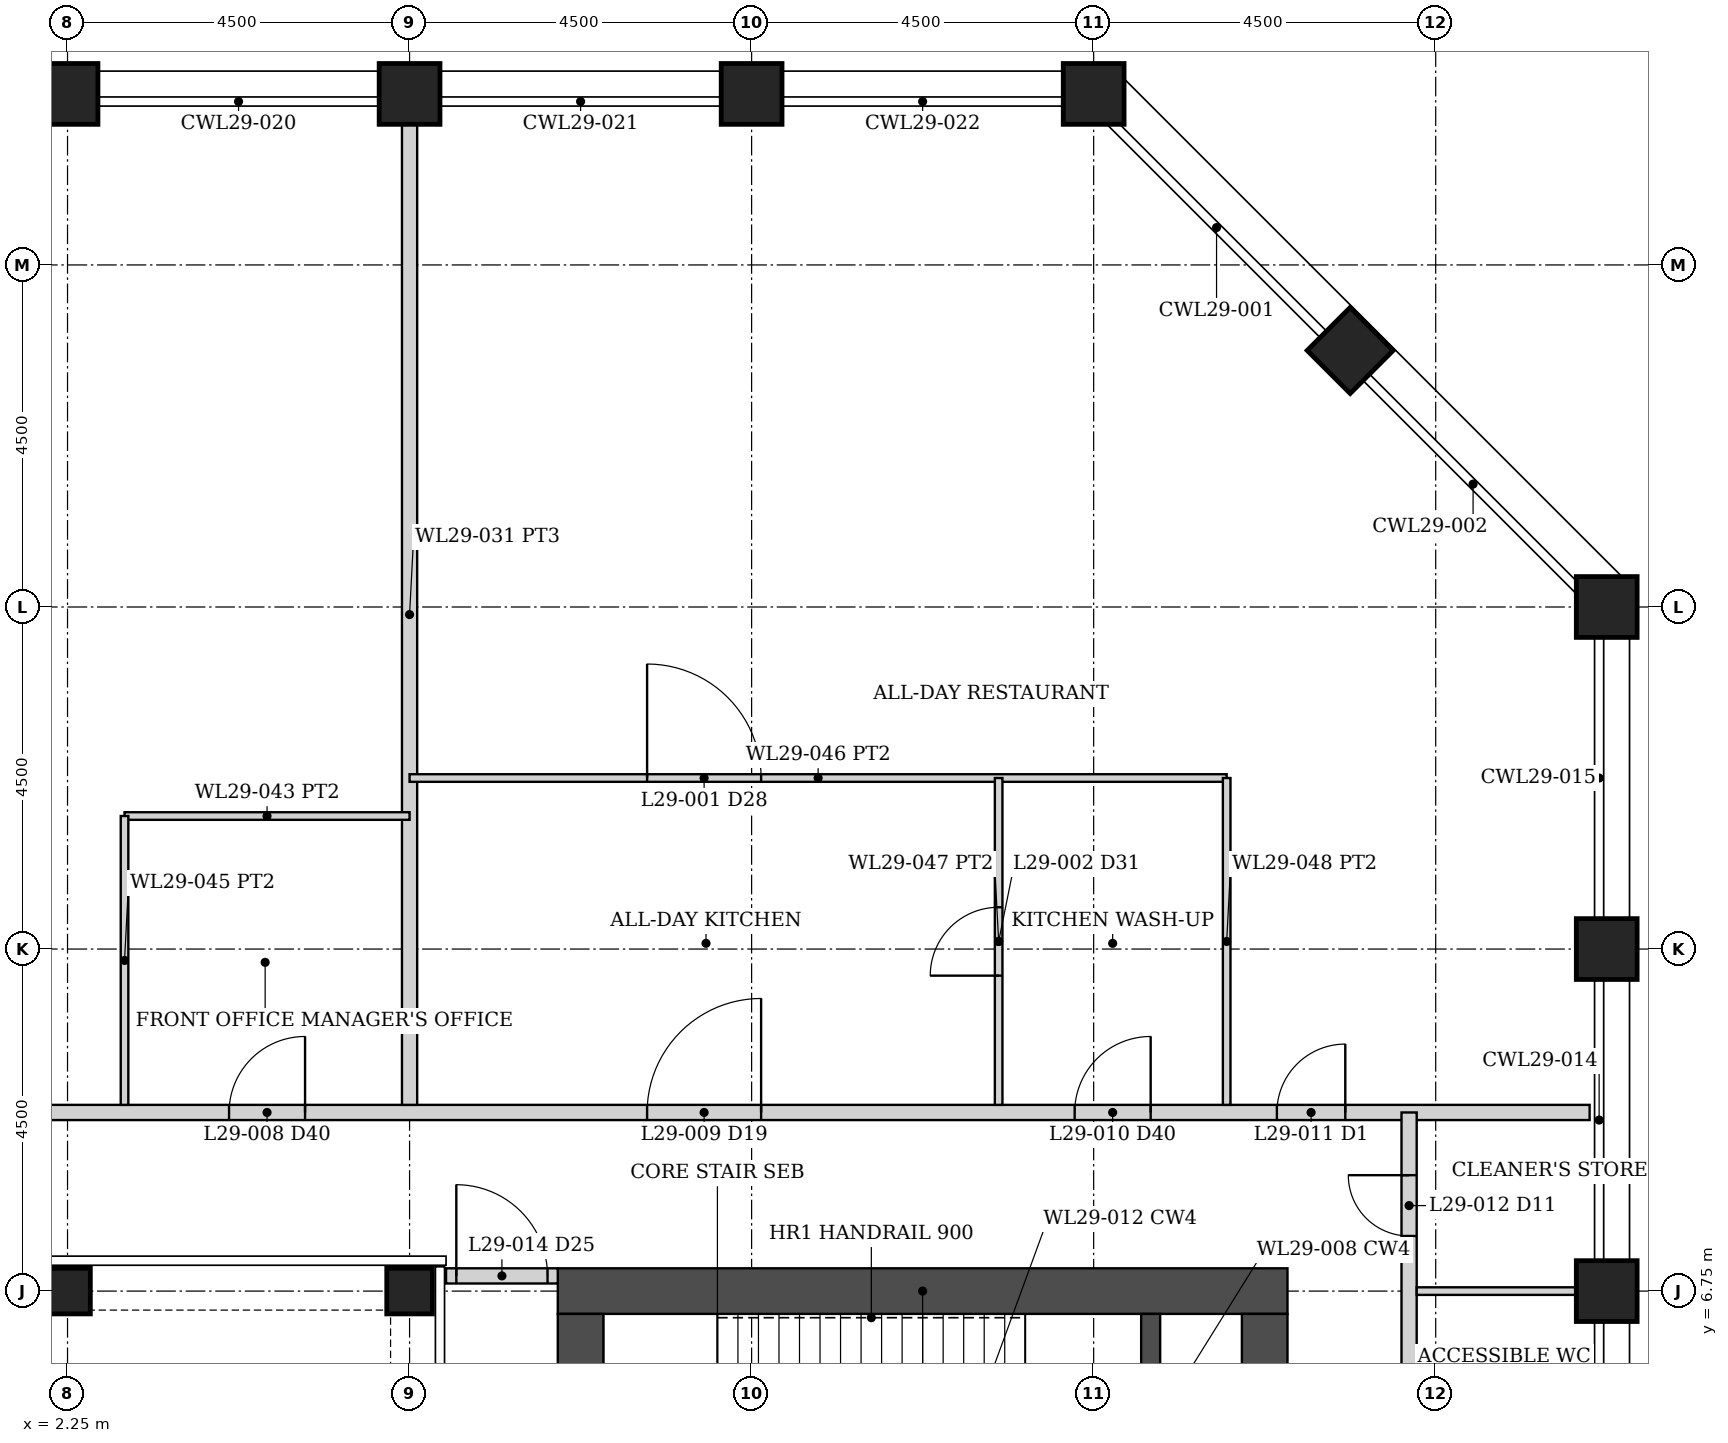
"""IFC4 building model, lengths in metres.
Left out: names, types, materials, properties, quantities, classifications, styles, units other than length and angle.
Written with IfcOpenShell. Run it as: python <this file> out.ifc"""

import sys

from ifc_helpers import new_model, si_unit, direction, frame, frame_2d, origin, origin_2d, place, context, subcontext, project, spatial, rectangle, hollow_rectangle, extrude, element, fill, save


model = new_model("IFC4")
c1 = context("Model", 3, precision=1e-05, world=origin(), true_north=direction((0.0, 1.0)))
c2 = subcontext(c1, "Body", "Model", "MODEL_VIEW")
j1 = project(units=[si_unit("LENGTHUNIT", "METRE"), si_unit("PLANEANGLEUNIT", "RADIAN")], contexts=[c1])
p1 = place(None, origin())
s1 = spatial("IfcSite", under=j1, at=p1, CompositionType="ELEMENT")
p2 = place(p1, origin())
s2 = spatial("IfcBuilding", under=s1, at=p2, CompositionType="ELEMENT")
p3 = place(p2, frame((0.0, 0.0, 112.4)))
s3 = spatial("IfcBuildingStorey", under=s2, at=p3, CompositionType="ELEMENT", Elevation=112.4)
for number, where, z_axis, x_axis in (
    (1, (2.25, 22.5, 0.0), (0.0, 0.0, 1.0), (0.0, 1.0, 0.0)),
    (2, (6.75, 22.5, 0.0), (0.0, 0.0, 1.0), (0.0, 1.0, 0.0)),
    (3, (22.5, 6.75, 0.0), (0.0, 0.0, 1.0), (1.0, 0.0, 0.0)),
    (4, (11.25, 22.5, 0.0), (0.0, 0.0, 1.0), (0.0, 1.0, 0.0)),
    (5, (22.5, 11.25, 0.0), (0.0, 0.0, 1.0), (1.0, 0.0, 0.0)),
    (6, (15.75, 22.5, 0.0), (0.0, 0.0, 1.0), (0.0, 1.0, 0.0)),
    (7, (22.5, 15.75, 0.0), (0.0, 0.0, 1.0), (1.0, 0.0, 0.0)),
    (8, (19.125, 19.125, 0.0), (0.0, 0.0, 1.0), (0.707, 0.707, 0.0)),
):
    element("IfcColumn", number, at=place(p3, frame(where, z_axis=z_axis, x_axis=x_axis)), inside=s3, PredefinedType="COLUMN", context=c2, shape_type="SweptSolid", body=[
        extrude(hollow_rectangle(XDim=0.8, YDim=0.8, WallThickness=0.06, at=origin_2d()), origin(), (0.0, 0.0, 1.0), 6.0),
    ])
for number, where, z_axis, x_axis in (
    (9, (2.25, 6.75, 0.0), (0.0, 0.0, 1.0), (1.0, 0.0, 0.0)),
    (10, (6.75, 6.75, 0.0), (0.0, 0.0, 1.0), (1.0, 0.0, 0.0)),
):
    element("IfcColumn", number, at=place(p3, frame(where, z_axis=z_axis, x_axis=x_axis)), inside=s3, PredefinedType="COLUMN", context=c2, shape_type="SweptSolid", body=[
        extrude(hollow_rectangle(XDim=0.6, YDim=0.6, WallThickness=0.04, at=origin_2d()), origin(), (0.0, 0.0, 1.0), 6.0),
    ])
p4 = place(p3, frame((8.7, 6.75, 0.0), z_axis=(0.0, 0.0, 1.0), x_axis=(1.0, 0.0, 0.0)))
e11 = element("IfcWall", 11, at=p4, inside=s3, PredefinedType="SHEAR", context=c2, shape_type="SweptSolid", body=[
    extrude(rectangle(XDim=9.6, YDim=0.6, at=frame_2d((4.8, 0.0))), origin(), (0.0, 0.0, 1.0), 6.0),
])
p5 = place(p3, frame((9.0, -6.45, 0.0), z_axis=(0.0, 0.0, 1.0), x_axis=(0.0, 1.0, 0.0)))
e12 = element("IfcWall", 12, at=p5, inside=s3, PredefinedType="SHEAR", context=c2, shape_type="SweptSolid", body=[
    extrude(rectangle(XDim=12.9, YDim=0.6, at=frame_2d((6.45, 0.0))), origin(), (0.0, 0.0, 1.0), 6.0),
])
p6 = place(p5, frame((3.55, 0.0, 0.0)))
e13 = element("IfcOpeningElement", 13, at=p6, cuts=e12, PredefinedType="OPENING", context=c2, shape_type="SweptSolid", body=[
    extrude(rectangle(XDim=1.0, YDim=2.1, at=frame_2d((0.5, 1.05))), frame((0.0, 0.31, 0.0), z_axis=(0.0, -1.0, 0.0), x_axis=(1.0, 0.0, 0.0)), (0.0, 0.0, 1.0), 0.62),
])
p7 = place(p5, frame((6.95, 0.0, 0.0)))
e14 = element("IfcOpeningElement", 14, at=p7, cuts=e12, PredefinedType="OPENING", context=c2, shape_type="SweptSolid", body=[
    extrude(rectangle(XDim=1.2, YDim=2.1, at=frame_2d((0.6, 1.05))), frame((0.0, 0.31, 0.0), z_axis=(0.0, -1.0, 0.0), x_axis=(1.0, 0.0, 0.0)), (0.0, 0.0, 1.0), 0.62),
])
p8 = place(p5, frame((10.85, 0.0, 0.0)))
e15 = element("IfcOpeningElement", 15, at=p8, cuts=e12, PredefinedType="OPENING", context=c2, shape_type="SweptSolid", body=[
    extrude(rectangle(XDim=1.0, YDim=2.1, at=frame_2d((0.5, 1.05))), frame((0.0, 0.31, 0.0), z_axis=(0.0, -1.0, 0.0), x_axis=(1.0, 0.0, 0.0)), (0.0, 0.0, 1.0), 0.62),
])
p9 = place(p3, frame((18.0, -6.45, 0.0), z_axis=(0.0, 0.0, 1.0), x_axis=(0.0, 1.0, 0.0)))
e16 = element("IfcWall", 16, at=p9, inside=s3, PredefinedType="SHEAR", context=c2, shape_type="SweptSolid", body=[
    extrude(rectangle(XDim=12.9, YDim=0.6, at=frame_2d((6.45, 0.0))), origin(), (0.0, 0.0, 1.0), 6.0),
])
p10 = place(p3, frame((16.5, 3.325, 0.0), z_axis=(0.0, 0.0, 1.0), x_axis=(0.0, 1.0, 0.0)))
e17 = element("IfcWall", 17, at=p10, inside=s3, PredefinedType="SHEAR", context=c2, shape_type="SweptSolid", body=[
    extrude(rectangle(XDim=3.125, YDim=0.25, at=frame_2d((1.562, 0.0))), origin(), (0.0, 0.0, 1.0), 6.0),
])
p11 = place(p3, frame((7.23, 6.95, 0.0), z_axis=(0.0, 0.0, 1.0), x_axis=(1.0, 0.0, 0.0)))
e18 = element("IfcWall", 18, at=p11, inside=s3, PredefinedType="PARTITIONING", context=c2, shape_type="SweptSolid", body=[
    extrude(rectangle(XDim=1.47, YDim=0.2, at=frame_2d((0.735, 0.0))), origin(), (0.0, 0.0, 1.0), 4.874),
])
p12 = place(p11, frame((0.135, 0.0, 0.0)))
e19 = element("IfcOpeningElement", 19, at=p12, cuts=e18, PredefinedType="OPENING", context=c2, shape_type="SweptSolid", body=[
    extrude(rectangle(XDim=1.2, YDim=2.1, at=frame_2d((0.6, 1.05))), frame((0.0, 0.11, 0.0), z_axis=(0.0, -1.0, 0.0), x_axis=(1.0, 0.0, 0.0)), (0.0, 0.0, 1.0), 0.22),
])
p13 = place(p3, frame((-22.275, 9.1, 0.0), z_axis=(0.0, 0.0, 1.0), x_axis=(1.0, 0.0, 0.0)))
e20 = element("IfcWall", 20, at=p13, inside=s3, PredefinedType="PARTITIONING", context=c2, shape_type="SweptSolid", body=[
    extrude(rectangle(XDim=44.55, YDim=0.2, at=frame_2d((22.275, 0.0))), origin(), (0.0, 0.0, 1.0), 4.874),
])
p14 = place(p13, frame((4.065, 0.0, 0.0)))
e21 = element("IfcOpeningElement", 21, at=p14, cuts=e20, PredefinedType="OPENING", context=c2, shape_type="SweptSolid", body=[
    extrude(rectangle(XDim=0.9, YDim=2.1, at=frame_2d((0.45, 1.05))), frame((0.0, 0.11, 0.0), z_axis=(0.0, -1.0, 0.0), x_axis=(1.0, 0.0, 0.0)), (0.0, 0.0, 1.0), 0.22),
])
p15 = place(p13, frame((9.625, 0.0, 0.0)))
e22 = element("IfcOpeningElement", 22, at=p15, cuts=e20, PredefinedType="OPENING", context=c2, shape_type="SweptSolid", body=[
    extrude(rectangle(XDim=0.8, YDim=2.1, at=frame_2d((0.4, 1.05))), frame((0.0, 0.11, 0.0), z_axis=(0.0, -1.0, 0.0), x_axis=(1.0, 0.0, 0.0)), (0.0, 0.0, 1.0), 0.22),
])
p16 = place(p13, frame((12.8, 0.0, 0.0)))
e23 = element("IfcOpeningElement", 23, at=p16, cuts=e20, PredefinedType="OPENING", context=c2, shape_type="SweptSolid", body=[
    extrude(rectangle(XDim=1.2, YDim=2.1, at=frame_2d((0.6, 1.05))), frame((0.0, 0.11, 0.0), z_axis=(0.0, -1.0, 0.0), x_axis=(1.0, 0.0, 0.0)), (0.0, 0.0, 1.0), 0.22),
])
p17 = place(p13, frame((21.825, 0.0, 0.0)))
e24 = element("IfcOpeningElement", 24, at=p17, cuts=e20, PredefinedType="OPENING", context=c2, shape_type="SweptSolid", body=[
    extrude(rectangle(XDim=0.9, YDim=2.1, at=frame_2d((0.45, 1.05))), frame((0.0, 0.11, 0.0), z_axis=(0.0, -1.0, 0.0), x_axis=(1.0, 0.0, 0.0)), (0.0, 0.0, 1.0), 0.22),
])
p18 = place(p13, frame((16.9, 0.0, 0.0)))
e25 = element("IfcOpeningElement", 25, at=p18, cuts=e20, PredefinedType="OPENING", context=c2, shape_type="SweptSolid", body=[
    extrude(rectangle(XDim=1.0, YDim=2.1, at=frame_2d((0.5, 1.05))), frame((0.0, 0.11, 0.0), z_axis=(0.0, -1.0, 0.0), x_axis=(1.0, 0.0, 0.0)), (0.0, 0.0, 1.0), 0.22),
])
p19 = place(p13, frame((26.65, 0.0, 0.0)))
e26 = element("IfcOpeningElement", 26, at=p19, cuts=e20, PredefinedType="OPENING", context=c2, shape_type="SweptSolid", body=[
    extrude(rectangle(XDim=1.0, YDim=2.1, at=frame_2d((0.5, 1.05))), frame((0.0, 0.11, 0.0), z_axis=(0.0, -1.0, 0.0), x_axis=(1.0, 0.0, 0.0)), (0.0, 0.0, 1.0), 0.22),
])
p20 = place(p13, frame((40.436, 0.0, 0.0)))
e27 = element("IfcOpeningElement", 27, at=p20, cuts=e20, PredefinedType="OPENING", context=c2, shape_type="SweptSolid", body=[
    extrude(rectangle(XDim=0.9, YDim=2.1, at=frame_2d((0.45, 1.05))), frame((0.0, 0.11, 0.0), z_axis=(0.0, -1.0, 0.0), x_axis=(1.0, 0.0, 0.0)), (0.0, 0.0, 1.0), 0.22),
])
p21 = place(p13, frame((32.15, 0.0, 0.0)))
e28 = element("IfcOpeningElement", 28, at=p21, cuts=e20, PredefinedType="OPENING", context=c2, shape_type="SweptSolid", body=[
    extrude(rectangle(XDim=1.5, YDim=2.1, at=frame_2d((0.75, 1.05))), frame((0.0, 0.11, 0.0), z_axis=(0.0, -1.0, 0.0), x_axis=(1.0, 0.0, 0.0)), (0.0, 0.0, 1.0), 0.22),
])
p22 = place(p13, frame((37.775, 0.0, 0.0)))
e29 = element("IfcOpeningElement", 29, at=p22, cuts=e20, PredefinedType="OPENING", context=c2, shape_type="SweptSolid", body=[
    extrude(rectangle(XDim=1.0, YDim=2.1, at=frame_2d((0.5, 1.05))), frame((0.0, 0.11, 0.0), z_axis=(0.0, -1.0, 0.0), x_axis=(1.0, 0.0, 0.0)), (0.0, 0.0, 1.0), 0.22),
])
p23 = place(p3, frame((19.9, -9.1, 0.0), z_axis=(0.0, 0.0, 1.0), x_axis=(0.0, 1.0, 0.0)))
e30 = element("IfcWall", 30, at=p23, inside=s3, PredefinedType="PARTITIONING", context=c2, shape_type="SweptSolid", body=[
    extrude(rectangle(XDim=18.2, YDim=0.2, at=frame_2d((9.1, 0.0))), origin(), (0.0, 0.0, 1.0), 4.874),
])
p24 = place(p23, frame((2.975, 0.0, 0.0)))
e31 = element("IfcOpeningElement", 31, at=p24, cuts=e30, PredefinedType="OPENING", context=c2, shape_type="SweptSolid", body=[
    extrude(rectangle(XDim=1.0, YDim=2.1, at=frame_2d((0.5, 1.05))), frame((0.0, 0.11, 0.0), z_axis=(0.0, -1.0, 0.0), x_axis=(1.0, 0.0, 0.0)), (0.0, 0.0, 1.0), 0.22),
])
p25 = place(p23, frame((8.6, 0.0, 0.0)))
e32 = element("IfcOpeningElement", 32, at=p25, cuts=e30, PredefinedType="OPENING", context=c2, shape_type="SweptSolid", body=[
    extrude(rectangle(XDim=1.0, YDim=2.1, at=frame_2d((0.5, 1.05))), frame((0.0, 0.11, 0.0), z_axis=(0.0, -1.0, 0.0), x_axis=(1.0, 0.0, 0.0)), (0.0, 0.0, 1.0), 0.22),
])
p26 = place(p23, frame((13.1, 0.0, 0.0)))
e33 = element("IfcOpeningElement", 33, at=p26, cuts=e30, PredefinedType="OPENING", context=c2, shape_type="SweptSolid", body=[
    extrude(rectangle(XDim=1.0, YDim=2.1, at=frame_2d((0.5, 1.05))), frame((0.0, 0.11, 0.0), z_axis=(0.0, -1.0, 0.0), x_axis=(1.0, 0.0, 0.0)), (0.0, 0.0, 1.0), 0.22),
])
p27 = place(p23, frame((16.575, 0.0, 0.0)))
e34 = element("IfcOpeningElement", 34, at=p27, cuts=e30, PredefinedType="OPENING", context=c2, shape_type="SweptSolid", body=[
    extrude(rectangle(XDim=0.8, YDim=2.1, at=frame_2d((0.4, 1.05))), frame((0.0, 0.11, 0.0), z_axis=(0.0, -1.0, 0.0), x_axis=(1.0, 0.0, 0.0)), (0.0, 0.0, 1.0), 0.22),
])
p28 = place(p3, frame((6.75, 9.2, 0.0), z_axis=(0.0, 0.0, 1.0), x_axis=(0.0, 1.0, 0.0)))
e35 = element("IfcWall", 35, at=p28, inside=s3, PredefinedType="PARTITIONING", context=c2, shape_type="SweptSolid", body=[
    extrude(rectangle(XDim=12.9, YDim=0.2, at=frame_2d((6.45, 0.0))), origin(), (0.0, 0.0, 1.0), 4.874),
])
p29 = place(p3, frame((3.0, 13.0, 0.0), z_axis=(0.0, 0.0, 1.0), x_axis=(1.0, 0.0, 0.0)))
e36 = element("IfcWall", 36, at=p29, inside=s3, PredefinedType="PARTITIONING", context=c2, shape_type="SweptSolid", body=[
    extrude(rectangle(XDim=3.75, YDim=0.1, at=frame_2d((1.875, 0.0))), origin(), (0.0, 0.0, 1.0), 4.874),
])
p30 = place(p3, frame((3.0, 9.2, 0.0), z_axis=(0.0, 0.0, 1.0), x_axis=(0.0, 1.0, 0.0)))
e37 = element("IfcWall", 37, at=p30, inside=s3, PredefinedType="PARTITIONING", context=c2, shape_type="SweptSolid", body=[
    extrude(rectangle(XDim=3.8, YDim=0.1, at=frame_2d((1.9, 0.0))), origin(), (0.0, 0.0, 1.0), 4.874),
])
p31 = place(p3, frame((6.75, 13.5, 0.0), z_axis=(0.0, 0.0, 1.0), x_axis=(1.0, 0.0, 0.0)))
e38 = element("IfcWall", 38, at=p31, inside=s3, PredefinedType="PARTITIONING", context=c2, shape_type="SweptSolid", body=[
    extrude(rectangle(XDim=10.75, YDim=0.1, at=frame_2d((5.375, 0.0))), origin(), (0.0, 0.0, 1.0), 4.874),
])
p32 = place(p31, frame((3.125, 0.0, 0.0)))
e39 = element("IfcOpeningElement", 39, at=p32, cuts=e38, PredefinedType="OPENING", context=c2, shape_type="SweptSolid", body=[
    extrude(rectangle(XDim=1.5, YDim=2.1, at=frame_2d((0.75, 1.05))), frame((0.0, 0.06, 0.0), z_axis=(0.0, -1.0, 0.0), x_axis=(1.0, 0.0, 0.0)), (0.0, 0.0, 1.0), 0.12),
])
p33 = place(p3, frame((14.5, 9.2, 0.0), z_axis=(0.0, 0.0, 1.0), x_axis=(0.0, 1.0, 0.0)))
e40 = element("IfcWall", 40, at=p33, inside=s3, PredefinedType="PARTITIONING", context=c2, shape_type="SweptSolid", body=[
    extrude(rectangle(XDim=4.3, YDim=0.1, at=frame_2d((2.15, 0.0))), origin(), (0.0, 0.0, 1.0), 4.874),
])
p34 = place(p33, frame((1.7, 0.0, 0.0)))
e41 = element("IfcOpeningElement", 41, at=p34, cuts=e40, PredefinedType="OPENING", context=c2, shape_type="SweptSolid", body=[
    extrude(rectangle(XDim=0.9, YDim=2.1, at=frame_2d((0.45, 1.05))), frame((0.0, 0.06, 0.0), z_axis=(0.0, -1.0, 0.0), x_axis=(1.0, 0.0, 0.0)), (0.0, 0.0, 1.0), 0.12),
])
p35 = place(p3, frame((17.5, 9.2, 0.0), z_axis=(0.0, 0.0, 1.0), x_axis=(0.0, 1.0, 0.0)))
e42 = element("IfcWall", 42, at=p35, inside=s3, PredefinedType="PARTITIONING", context=c2, shape_type="SweptSolid", body=[
    extrude(rectangle(XDim=4.3, YDim=0.1, at=frame_2d((2.15, 0.0))), origin(), (0.0, 0.0, 1.0), 4.874),
])
p36 = place(p3, frame((20.0, 6.75, 0.0), z_axis=(0.0, 0.0, 1.0), x_axis=(1.0, 0.0, 0.0)))
e43 = element("IfcWall", 43, at=p36, inside=s3, PredefinedType="PARTITIONING", context=c2, shape_type="SweptSolid", body=[
    extrude(rectangle(XDim=2.1, YDim=0.1, at=frame_2d((1.05, 0.0))), origin(), (0.0, 0.0, 1.0), 4.874),
])
p37 = place(p12, origin())
e44 = element("IfcDoor", 44, at=p37, inside=s3, OperationType="DOUBLE_DOOR_DOUBLE_SWING", PredefinedType="DOOR", context=c2, shape_type="SweptSolid", body=[
    extrude(rectangle(XDim=1.2, YDim=2.1, at=frame_2d((0.6, 1.05))), frame((0.0, 0.025, 0.0), z_axis=(0.0, -1.0, 0.0), x_axis=(1.0, 0.0, 0.0)), (0.0, 0.0, 1.0), 0.05),
])
fill(e19, e44)
p38 = place(p19, origin())
e45 = element("IfcDoor", 45, at=p38, inside=s3, OperationType="SINGLE_SWING_RIGHT", PredefinedType="DOOR", context=c2, shape_type="SweptSolid", body=[
    extrude(rectangle(XDim=1.0, YDim=2.1, at=frame_2d((0.5, 1.05))), frame((0.0, 0.025, 0.0), z_axis=(0.0, -1.0, 0.0), x_axis=(1.0, 0.0, 0.0)), (0.0, 0.0, 1.0), 0.05),
])
fill(e26, e45)
p39 = place(p20, origin())
e46 = element("IfcDoor", 46, at=p39, inside=s3, OperationType="SINGLE_SWING_RIGHT", PredefinedType="DOOR", context=c2, shape_type="SweptSolid", body=[
    extrude(rectangle(XDim=0.9, YDim=2.1, at=frame_2d((0.45, 1.05))), frame((0.0, 0.025, 0.0), z_axis=(0.0, -1.0, 0.0), x_axis=(1.0, 0.0, 0.0)), (0.0, 0.0, 1.0), 0.05),
])
fill(e27, e46)
p40 = place(p32, origin())
e47 = element("IfcDoor", 47, at=p40, inside=s3, OperationType="SINGLE_SWING_LEFT", PredefinedType="DOOR", context=c2, shape_type="SweptSolid", body=[
    extrude(rectangle(XDim=1.5, YDim=2.1, at=frame_2d((0.75, 1.05))), frame((0.0, 0.025, 0.0), z_axis=(0.0, -1.0, 0.0), x_axis=(1.0, 0.0, 0.0)), (0.0, 0.0, 1.0), 0.05),
])
fill(e39, e47)
p41 = place(p21, origin())
e48 = element("IfcDoor", 48, at=p41, inside=s3, OperationType="SINGLE_SWING_RIGHT", PredefinedType="DOOR", context=c2, shape_type="SweptSolid", body=[
    extrude(rectangle(XDim=1.5, YDim=2.1, at=frame_2d((0.75, 1.05))), frame((0.0, 0.025, 0.0), z_axis=(0.0, -1.0, 0.0), x_axis=(1.0, 0.0, 0.0)), (0.0, 0.0, 1.0), 0.05),
])
fill(e28, e48)
p42 = place(p22, origin())
e49 = element("IfcDoor", 49, at=p42, inside=s3, OperationType="SINGLE_SWING_RIGHT", PredefinedType="DOOR", context=c2, shape_type="SweptSolid", body=[
    extrude(rectangle(XDim=1.0, YDim=2.1, at=frame_2d((0.5, 1.05))), frame((0.0, 0.025, 0.0), z_axis=(0.0, -1.0, 0.0), x_axis=(1.0, 0.0, 0.0)), (0.0, 0.0, 1.0), 0.05),
])
fill(e29, e49)
p43 = place(p34, origin())
e50 = element("IfcDoor", 50, at=p43, inside=s3, OperationType="SINGLE_SWING_LEFT", PredefinedType="DOOR", context=c2, shape_type="SweptSolid", body=[
    extrude(rectangle(XDim=0.9, YDim=2.1, at=frame_2d((0.45, 1.05))), frame((0.0, 0.025, 0.0), z_axis=(0.0, -1.0, 0.0), x_axis=(1.0, 0.0, 0.0)), (0.0, 0.0, 1.0), 0.05),
])
fill(e41, e50)
p44 = place(p27, origin())
e51 = element("IfcDoor", 51, at=p44, inside=s3, OperationType="SINGLE_SWING_RIGHT", PredefinedType="DOOR", context=c2, shape_type="SweptSolid", body=[
    extrude(rectangle(XDim=0.8, YDim=2.1, at=frame_2d((0.4, 1.05))), frame((0.0, 0.025, 0.0), z_axis=(0.0, -1.0, 0.0), x_axis=(1.0, 0.0, 0.0)), (0.0, 0.0, 1.0), 0.05),
])
fill(e34, e51)
save(model, sys.argv[1])
